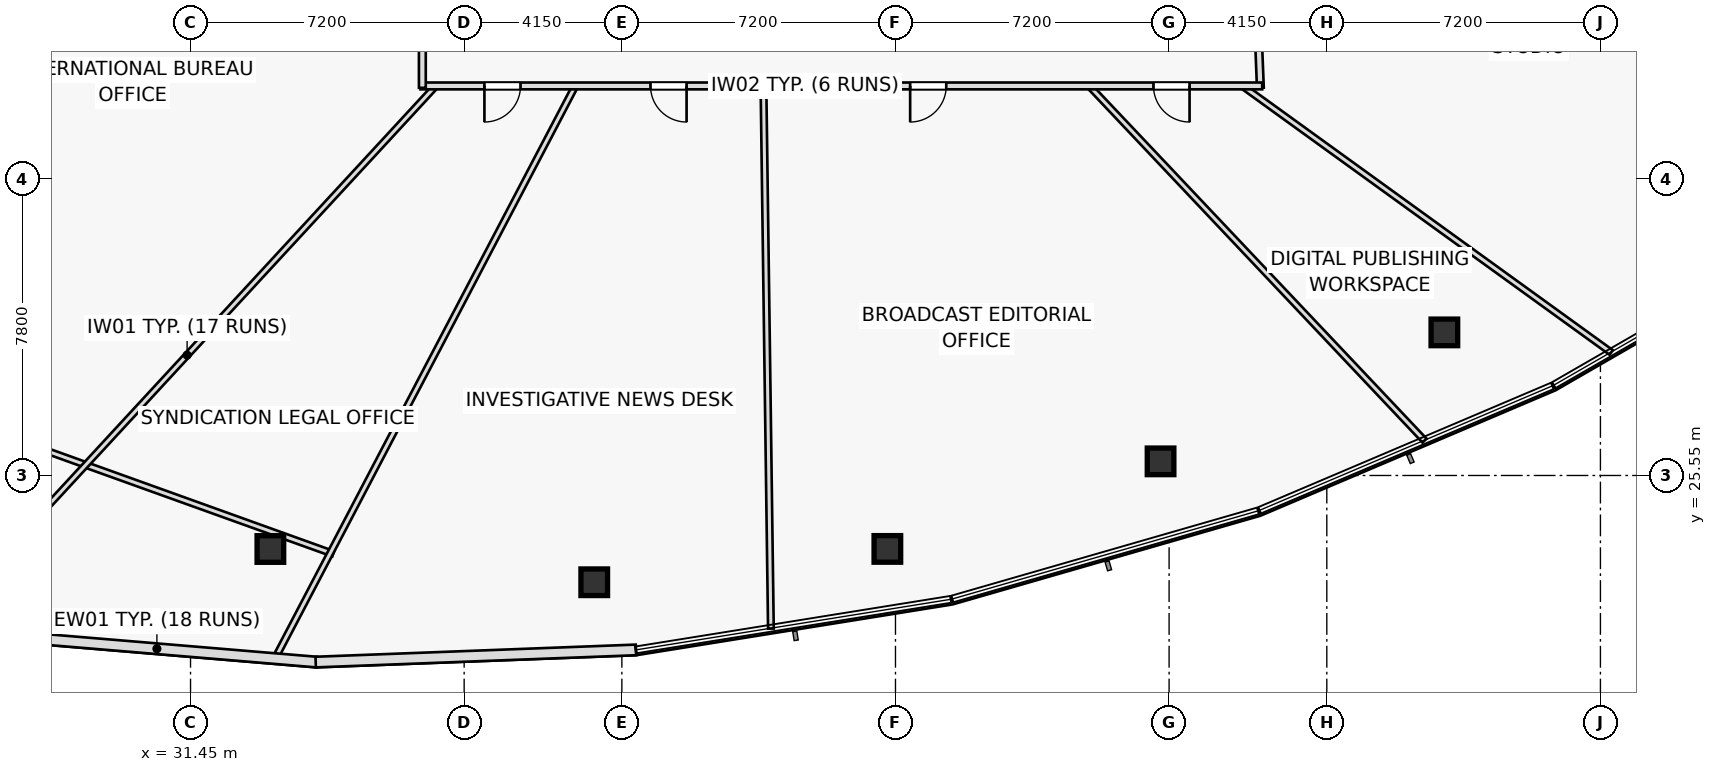
"""IFC4 building model, lengths in metres.
Left out: names, types, materials, properties, quantities, classifications, styles, units other than length and angle.
Written with IfcOpenShell. Run it as: python <this file> out.ifc"""

import sys

from ifc_helpers import new_model, si_unit, direction, frame, frame_2d, origin, origin_2d, place, context, subcontext, project, spatial, rectangle, hollow_rectangle, extrude, element, fill, save


model = new_model("IFC4")
c1 = context("Model", 3, precision=1e-05, world=origin(), true_north=direction((0.0, 1.0)))
c2 = subcontext(c1, "Body", "Model", "MODEL_VIEW")
j1 = project(units=[si_unit("LENGTHUNIT", "METRE"), si_unit("PLANEANGLEUNIT", "RADIAN")], contexts=[c1])
p1 = place(None, origin())
s1 = spatial("IfcSite", under=j1, at=p1, CompositionType="ELEMENT")
p2 = place(p1, origin())
s2 = spatial("IfcBuilding", under=s1, at=p2, CompositionType="ELEMENT")
p3 = place(p2, frame((0.0, 0.0, 78.3)))
s3 = spatial("IfcBuildingStorey", under=s2, at=p3, CompositionType="ELEMENT", Elevation=78.3)
for number, where, z_axis, x_axis in (
    (1, (33.551, 23.615, 0.0), (0.0, 0.0, 1.0), (1.0, 0.0, 0.0)),
    (2, (42.073, 22.74, 0.0), (0.0, 0.0, 1.0), (1.0, 0.0, 0.0)),
    (3, (49.787, 23.618, 0.0), (0.0, 0.0, 1.0), (1.0, 0.0, 0.0)),
    (4, (56.975, 25.921, 0.0), (0.0, 0.0, 1.0), (1.0, 0.0, 0.0)),
    (5, (64.444, 29.315, 0.0), (0.0, 0.0, 1.0), (1.0, 0.0, 0.0)),
):
    element("IfcColumn", number, at=place(p3, frame(where, z_axis=z_axis, x_axis=x_axis)), inside=s3, PredefinedType="COLUMN", context=c2, shape_type="SweptSolid", body=[
        extrude(hollow_rectangle(XDim=0.7, YDim=0.7, WallThickness=0.04, at=origin_2d()), origin(), (0.0, 0.0, 1.0), 3.6),
    ])
p4 = place(p3, frame((22.802, 27.945, 0.0), z_axis=(0.0, 0.0, 1.0), x_axis=(0.941102349209, -0.338121824662, 0.0)))
e6 = element("IfcWall", 6, at=p4, inside=s3, PredefinedType="PARTITIONING", context=c2, shape_type="SweptSolid", body=[
    extrude(rectangle(XDim=13.18, YDim=0.15, at=frame_2d((6.59, 0.0))), origin(), (0.0, 0.0, 1.0), 2.975),
])
p5 = place(p3, frame((37.903, 35.8, 0.0), z_axis=(0.0, 0.0, 1.0), x_axis=(-0.678491433726, -0.734608313566, 0.0)))
e7 = element("IfcWall", 7, at=p5, inside=s3, PredefinedType="PARTITIONING", context=c2, shape_type="SweptSolid", body=[
    extrude(rectangle(XDim=19.286, YDim=0.15, at=frame_2d((9.643, 0.0))), origin(), (0.0, 0.0, 1.0), 2.975),
])
p6 = place(p3, frame((41.575, 35.8, 0.0), z_axis=(0.0, 0.0, 1.0), x_axis=(-0.464491295954, -0.885577684895, 0.0)))
e8 = element("IfcWall", 8, at=p6, inside=s3, PredefinedType="PARTITIONING", context=c2, shape_type="SweptSolid", body=[
    extrude(rectangle(XDim=17.026, YDim=0.15, at=frame_2d((8.513, 0.0))), origin(), (0.0, 0.0, 1.0), 2.975),
])
p7 = place(p3, frame((46.526, 35.8, 0.0), z_axis=(0.0, 0.0, 1.0), x_axis=(0.013711159918, -0.999905997629, 0.0)))
e9 = element("IfcWall", 9, at=p7, inside=s3, PredefinedType="PARTITIONING", context=c2, shape_type="SweptSolid", body=[
    extrude(rectangle(XDim=14.28, YDim=0.15, at=frame_2d((7.14, 0.0))), origin(), (0.0, 0.0, 1.0), 2.975),
])
p8 = place(p3, frame((55.098, 35.8, 0.0), z_axis=(0.0, 0.0, 1.0), x_axis=(0.687012477337, -0.726645619256, 0.0)))
e10 = element("IfcWall", 10, at=p8, inside=s3, PredefinedType="PARTITIONING", context=c2, shape_type="SweptSolid", body=[
    extrude(rectangle(XDim=12.844, YDim=0.15, at=frame_2d((6.422, 0.0))), origin(), (0.0, 0.0, 1.0), 2.975),
])
p9 = place(p3, frame((59.13, 35.8, 0.0), z_axis=(0.0, 0.0, 1.0), x_axis=(0.810498534466, -0.585740664141, 0.0)))
e11 = element("IfcWall", 11, at=p9, inside=s3, PredefinedType="PARTITIONING", context=c2, shape_type="SweptSolid", body=[
    extrude(rectangle(XDim=11.974, YDim=0.15, at=frame_2d((5.987, 0.0))), origin(), (0.0, 0.0, 1.0), 2.975),
])
p10 = place(p3, frame((59.392, 41.1, 0.0), z_axis=(0.0, 0.0, 1.0), x_axis=(0.03921413315, -0.999230830069, 0.0)))
e12 = element("IfcWall", 12, at=p10, inside=s3, PredefinedType="PARTITIONING", context=c2, shape_type="SweptSolid", body=[
    extrude(rectangle(XDim=5.354, YDim=0.18, at=frame_2d((2.677, 0.0))), origin(), (0.0, 0.0, 1.0), 2.975),
])
p11 = place(p10, frame((2.202, 0.0, 0.0)))
e13 = element("IfcOpeningElement", 13, at=p11, cuts=e12, PredefinedType="OPENING", context=c2, shape_type="SweptSolid", body=[
    extrude(rectangle(XDim=0.95, YDim=2.05, at=frame_2d((0.475, 1.025))), frame((0.0, 0.1, 0.0), z_axis=(0.0, -1.0, 0.0), x_axis=(1.0, 0.0, 0.0)), (0.0, 0.0, 1.0), 0.2),
])
p12 = place(p3, frame((59.65, 35.8, 0.0), z_axis=(0.0, 0.0, 1.0), x_axis=(-1.0, 0.0, 0.0)))
e14 = element("IfcWall", 14, at=p12, inside=s3, PredefinedType="PARTITIONING", context=c2, shape_type="SweptSolid", body=[
    extrude(rectangle(XDim=22.15, YDim=0.18, at=frame_2d((11.075, 0.0))), origin(), (0.0, 0.0, 1.0), 2.975),
])
p13 = place(p12, frame((1.911, 0.0, 0.0)))
e15 = element("IfcOpeningElement", 15, at=p13, cuts=e14, PredefinedType="OPENING", context=c2, shape_type="SweptSolid", body=[
    extrude(rectangle(XDim=0.95, YDim=2.05, at=frame_2d((0.475, 1.025))), frame((0.0, 0.1, 0.0), z_axis=(0.0, -1.0, 0.0), x_axis=(1.0, 0.0, 0.0)), (0.0, 0.0, 1.0), 0.2),
])
p14 = place(p12, frame((8.314, 0.0, 0.0)))
e16 = element("IfcOpeningElement", 16, at=p14, cuts=e14, PredefinedType="OPENING", context=c2, shape_type="SweptSolid", body=[
    extrude(rectangle(XDim=0.95, YDim=2.05, at=frame_2d((0.475, 1.025))), frame((0.0, 0.1, 0.0), z_axis=(0.0, -1.0, 0.0), x_axis=(1.0, 0.0, 0.0)), (0.0, 0.0, 1.0), 0.2),
])
p15 = place(p12, frame((15.147, 0.0, 0.0)))
e17 = element("IfcOpeningElement", 17, at=p15, cuts=e14, PredefinedType="OPENING", context=c2, shape_type="SweptSolid", body=[
    extrude(rectangle(XDim=0.95, YDim=2.05, at=frame_2d((0.475, 1.025))), frame((0.0, 0.1, 0.0), z_axis=(0.0, -1.0, 0.0), x_axis=(1.0, 0.0, 0.0)), (0.0, 0.0, 1.0), 0.2),
])
p16 = place(p12, frame((19.517, 0.0, 0.0)))
e18 = element("IfcOpeningElement", 18, at=p16, cuts=e14, PredefinedType="OPENING", context=c2, shape_type="SweptSolid", body=[
    extrude(rectangle(XDim=0.95, YDim=2.05, at=frame_2d((0.475, 1.025))), frame((0.0, 0.1, 0.0), z_axis=(0.0, -1.0, 0.0), x_axis=(1.0, 0.0, 0.0)), (0.0, 0.0, 1.0), 0.2),
])
p17 = place(p3, frame((37.55, 35.75, 0.0), z_axis=(0.0, 0.0, 1.0), x_axis=(0.0, 1.0, 0.0)))
e19 = element("IfcWall", 19, at=p17, inside=s3, PredefinedType="PARTITIONING", context=c2, shape_type="SweptSolid", body=[
    extrude(rectangle(XDim=12.75, YDim=0.18, at=frame_2d((6.375, 0.0))), origin(), (0.0, 0.0, 1.0), 2.975),
])
p18 = place(p17, frame((3.417, 0.0, 0.0)))
e20 = element("IfcOpeningElement", 20, at=p18, cuts=e19, PredefinedType="OPENING", context=c2, shape_type="SweptSolid", body=[
    extrude(rectangle(XDim=0.95, YDim=2.05, at=frame_2d((0.475, 1.025))), frame((0.0, 0.1, 0.0), z_axis=(0.0, -1.0, 0.0), x_axis=(1.0, 0.0, 0.0)), (0.0, 0.0, 1.0), 0.2),
])
p19 = place(p17, frame((8.205, 0.0, 0.0)))
e21 = element("IfcOpeningElement", 21, at=p19, cuts=e19, PredefinedType="OPENING", context=c2, shape_type="SweptSolid", body=[
    extrude(rectangle(XDim=0.95, YDim=2.05, at=frame_2d((0.475, 1.025))), frame((0.0, 0.1, 0.0), z_axis=(0.0, -1.0, 0.0), x_axis=(1.0, 0.0, 0.0)), (0.0, 0.0, 1.0), 0.2),
])
p20 = place(p17, frame((10.687, 0.0, 0.0)))
e22 = element("IfcOpeningElement", 22, at=p20, cuts=e19, PredefinedType="OPENING", context=c2, shape_type="SweptSolid", body=[
    extrude(rectangle(XDim=0.95, YDim=2.05, at=frame_2d((0.475, 1.025))), frame((0.0, 0.1, 0.0), z_axis=(0.0, -1.0, 0.0), x_axis=(1.0, 0.0, 0.0)), (0.0, 0.0, 1.0), 0.2),
])
p21 = place(p3, frame((26.357, 21.343, 0.0), z_axis=(0.0, 0.0, 1.0), x_axis=(0.996526193792, -0.083279920065, 0.0)))
e23 = element("IfcWall", 23, at=p21, inside=s3, PredefinedType="STANDARD", context=c2, shape_type="SweptSolid", body=[
    extrude(rectangle(XDim=8.446, YDim=0.28, at=frame_2d((4.223, 0.0))), origin(), (0.0, 0.0, 1.0), 3.6),
])
p22 = place(p3, frame((34.743, 20.64, 0.0), z_axis=(0.0, 0.0, 1.0), x_axis=(0.999280671303, 0.037922815823, 0.0)))
e24 = element("IfcWall", 24, at=p22, inside=s3, PredefinedType="STANDARD", context=c2, shape_type="SweptSolid", body=[
    extrude(rectangle(XDim=8.434, YDim=0.28, at=frame_2d((4.217, 0.0))), origin(), (0.0, 0.0, 1.0), 3.6),
])
p23 = place(p13, origin())
e25 = element("IfcDoor", 25, at=p23, inside=s3, OperationType="SINGLE_SWING_LEFT", PredefinedType="DOOR", context=c2, shape_type="SweptSolid", body=[
    extrude(rectangle(XDim=0.95, YDim=2.05, at=frame_2d((0.475, 1.025))), frame((0.0, 0.025, 0.0), z_axis=(0.0, -1.0, 0.0), x_axis=(1.0, 0.0, 0.0)), (0.0, 0.0, 1.0), 0.05),
])
fill(e15, e25)
p24 = place(p14, origin())
e26 = element("IfcDoor", 26, at=p24, inside=s3, OperationType="SINGLE_SWING_RIGHT", PredefinedType="DOOR", context=c2, shape_type="SweptSolid", body=[
    extrude(rectangle(XDim=0.95, YDim=2.05, at=frame_2d((0.475, 1.025))), frame((0.0, 0.025, 0.0), z_axis=(0.0, -1.0, 0.0), x_axis=(1.0, 0.0, 0.0)), (0.0, 0.0, 1.0), 0.05),
])
fill(e16, e26)
p25 = place(p15, origin())
e27 = element("IfcDoor", 27, at=p25, inside=s3, OperationType="SINGLE_SWING_LEFT", PredefinedType="DOOR", context=c2, shape_type="SweptSolid", body=[
    extrude(rectangle(XDim=0.95, YDim=2.05, at=frame_2d((0.475, 1.025))), frame((0.0, 0.025, 0.0), z_axis=(0.0, -1.0, 0.0), x_axis=(1.0, 0.0, 0.0)), (0.0, 0.0, 1.0), 0.05),
])
fill(e17, e27)
p26 = place(p16, origin())
e28 = element("IfcDoor", 28, at=p26, inside=s3, OperationType="SINGLE_SWING_RIGHT", PredefinedType="DOOR", context=c2, shape_type="SweptSolid", body=[
    extrude(rectangle(XDim=0.95, YDim=2.05, at=frame_2d((0.475, 1.025))), frame((0.0, 0.025, 0.0), z_axis=(0.0, -1.0, 0.0), x_axis=(1.0, 0.0, 0.0)), (0.0, 0.0, 1.0), 0.05),
])
fill(e18, e28)
save(model, sys.argv[1])
